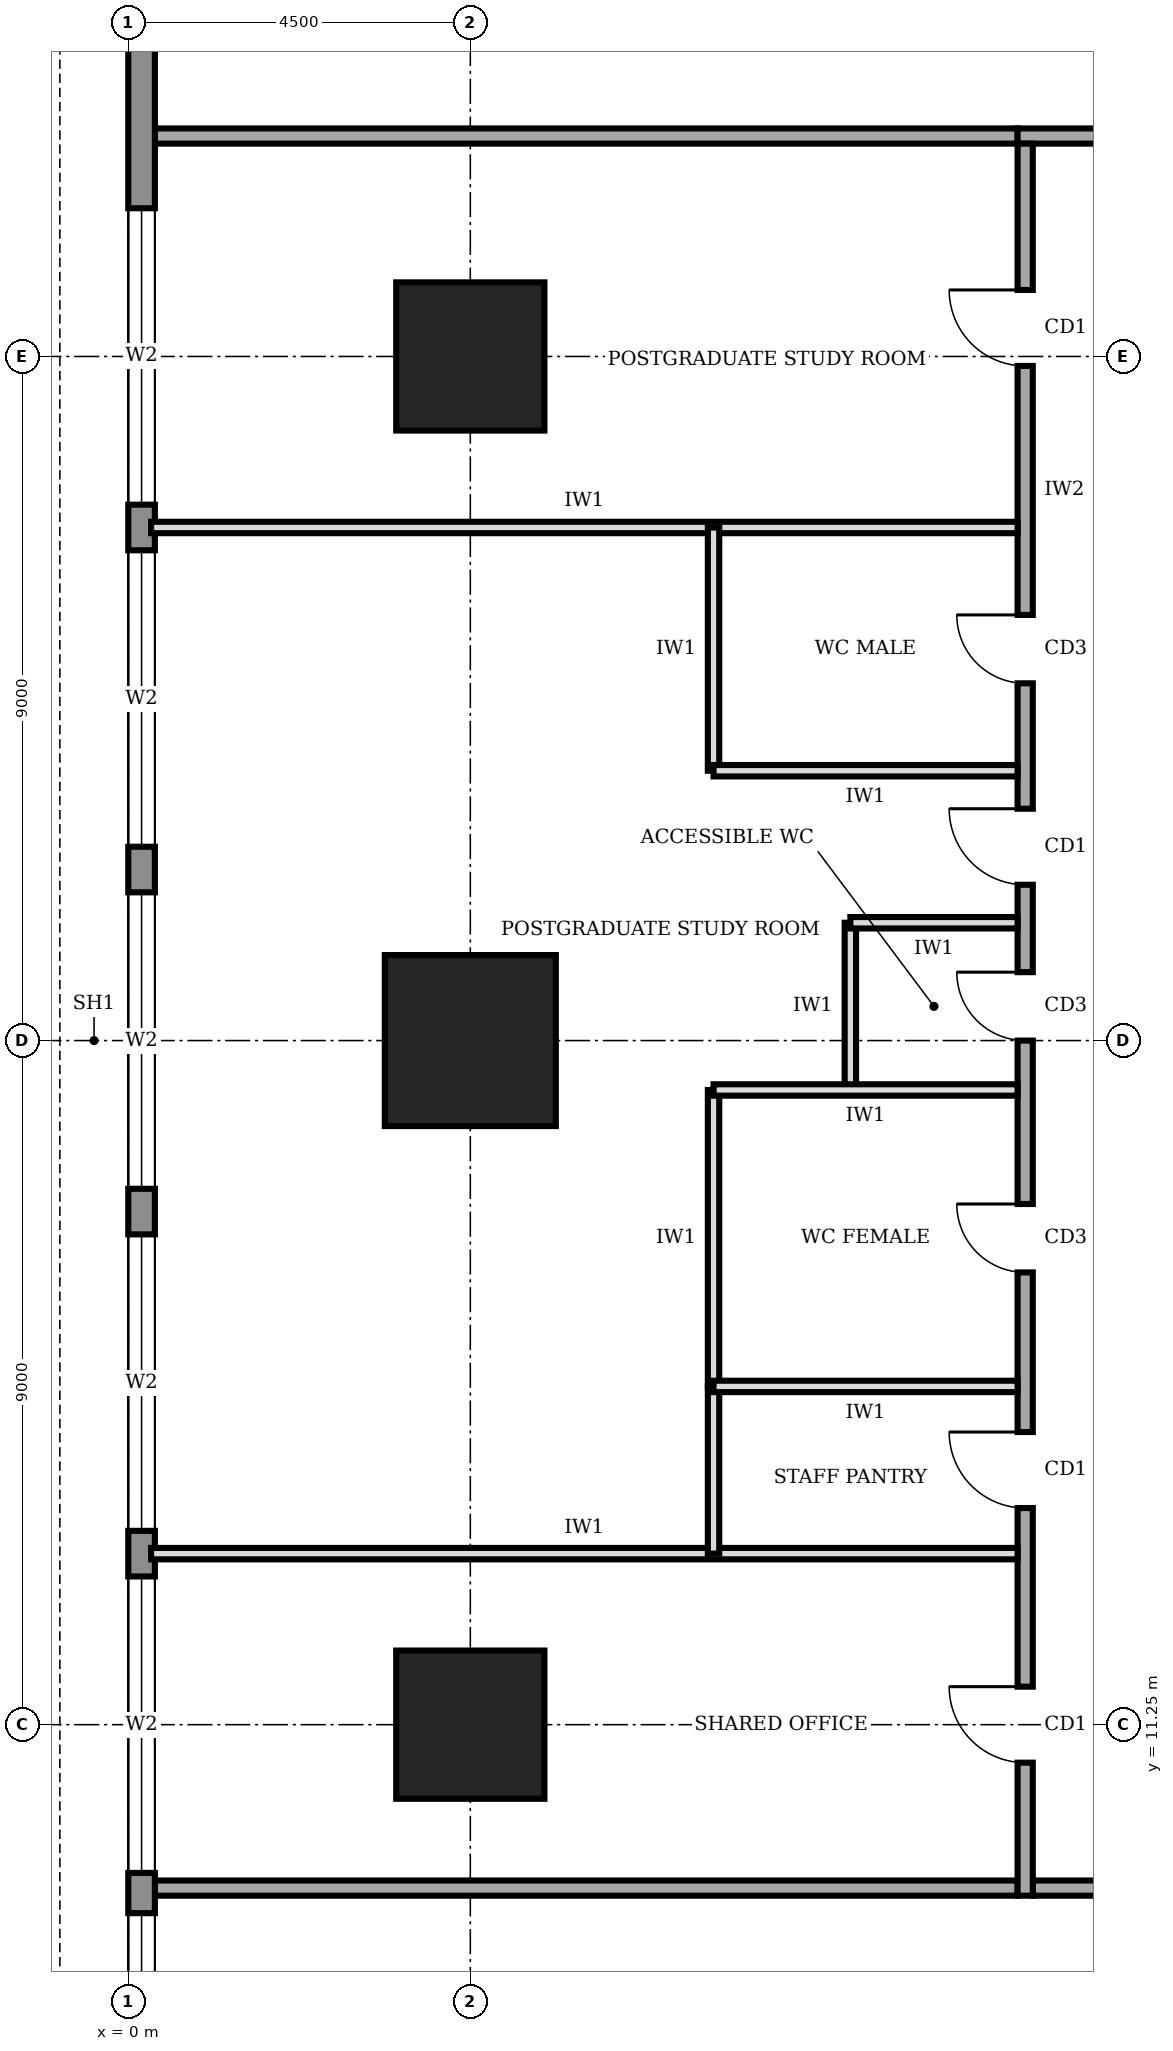
"""IFC4 building model, lengths in metres.
Left out: names, types, materials, properties, quantities, classifications, styles, units other than length and angle.
Written with IfcOpenShell. Run it as: python <this file> out.ifc"""

import sys

from ifc_helpers import new_model, si_unit, direction, frame, frame_2d, origin, origin_2d, place, context, subcontext, project, spatial, rectangle, extrude, element, fill, save


model = new_model("IFC4")
c1 = context("Model", 3, precision=1e-05, world=origin(), true_north=direction((0.0, 1.0)))
c2 = subcontext(c1, "Body", "Model", "MODEL_VIEW")
j1 = project(units=[si_unit("LENGTHUNIT", "METRE"), si_unit("PLANEANGLEUNIT", "RADIAN")], contexts=[c1])
p1 = place(None, origin())
s1 = spatial("IfcSite", under=j1, at=p1, CompositionType="ELEMENT")
p2 = place(p1, origin())
s2 = spatial("IfcBuilding", under=s1, at=p2, CompositionType="ELEMENT")
p3 = place(p2, frame((0.0, 0.0, 229.0)))
s3 = spatial("IfcBuildingStorey", under=s2, at=p3, CompositionType="ELEMENT", Elevation=229.0)
p4 = place(p3, frame((4.5, 11.25, 0.0), z_axis=(0.0, 0.0, 1.0), x_axis=(1.0, 0.0, 0.0)))
e1 = element("IfcColumn", 1, at=p4, inside=s3, PredefinedType="COLUMN", context=c2, shape_type="SweptSolid", body=[
    extrude(rectangle(XDim=1.95, YDim=1.95, at=origin_2d()), origin(), (0.0, 0.0, 1.0), 4.0),
])
p5 = place(p3, frame((4.5, 20.25, 0.0), z_axis=(0.0, 0.0, 1.0), x_axis=(1.0, 0.0, 0.0)))
e2 = element("IfcColumn", 2, at=p5, inside=s3, PredefinedType="COLUMN", context=c2, shape_type="SweptSolid", body=[
    extrude(rectangle(XDim=2.25, YDim=2.25, at=origin_2d()), origin(), (0.0, 0.0, 1.0), 4.0),
])
p6 = place(p3, frame((4.5, 29.25, 0.0), z_axis=(0.0, 0.0, 1.0), x_axis=(1.0, 0.0, 0.0)))
e3 = element("IfcColumn", 3, at=p6, inside=s3, PredefinedType="COLUMN", context=c2, shape_type="SweptSolid", body=[
    extrude(rectangle(XDim=1.95, YDim=1.95, at=origin_2d()), origin(), (0.0, 0.0, 1.0), 4.0),
])
p7 = place(p3, frame((0.175, 35.98, 0.0), z_axis=(0.0, 0.0, 1.0), x_axis=(0.0, -1.0, 0.0)))
e4 = element("IfcWall", 4, at=p7, inside=s3, PredefinedType="STANDARD", context=c2, shape_type="SweptSolid", body=[
    extrude(rectangle(XDim=31.46, YDim=0.35, at=frame_2d((15.73, 0.0))), origin(), (0.0, 0.0, 1.0), 3.75),
])
p8 = place(p7, frame((27.21, 0.0, 0.6)))
e5 = element("IfcOpeningElement", 5, at=p8, cuts=e4, PredefinedType="OPENING", context=c2, shape_type="SweptSolid", body=[
    extrude(rectangle(XDim=3.9, YDim=2.6, at=frame_2d((1.95, 1.3))), frame((0.0, 0.185, 0.0), z_axis=(0.0, -1.0, 0.0), x_axis=(1.0, 0.0, 0.0)), (0.0, 0.0, 1.0), 0.37),
])
p9 = place(p7, frame((22.78, 0.0, 0.6)))
e6 = element("IfcOpeningElement", 6, at=p9, cuts=e4, PredefinedType="OPENING", context=c2, shape_type="SweptSolid", body=[
    extrude(rectangle(XDim=3.9, YDim=2.6, at=frame_2d((1.95, 1.3))), frame((0.0, 0.185, 0.0), z_axis=(0.0, -1.0, 0.0), x_axis=(1.0, 0.0, 0.0)), (0.0, 0.0, 1.0), 0.37),
])
p10 = place(p7, frame((18.28, 0.0, 0.6)))
e7 = element("IfcOpeningElement", 7, at=p10, cuts=e4, PredefinedType="OPENING", context=c2, shape_type="SweptSolid", body=[
    extrude(rectangle(XDim=3.9, YDim=2.6, at=frame_2d((1.95, 1.3))), frame((0.0, 0.185, 0.0), z_axis=(0.0, -1.0, 0.0), x_axis=(1.0, 0.0, 0.0)), (0.0, 0.0, 1.0), 0.37),
])
p11 = place(p7, frame((13.78, 0.0, 0.6)))
e8 = element("IfcOpeningElement", 8, at=p11, cuts=e4, PredefinedType="OPENING", context=c2, shape_type="SweptSolid", body=[
    extrude(rectangle(XDim=3.9, YDim=2.6, at=frame_2d((1.95, 1.3))), frame((0.0, 0.185, 0.0), z_axis=(0.0, -1.0, 0.0), x_axis=(1.0, 0.0, 0.0)), (0.0, 0.0, 1.0), 0.37),
])
p12 = place(p7, frame((9.28, 0.0, 0.6)))
e9 = element("IfcOpeningElement", 9, at=p12, cuts=e4, PredefinedType="OPENING", context=c2, shape_type="SweptSolid", body=[
    extrude(rectangle(XDim=3.9, YDim=2.6, at=frame_2d((1.95, 1.3))), frame((0.0, 0.185, 0.0), z_axis=(0.0, -1.0, 0.0), x_axis=(1.0, 0.0, 0.0)), (0.0, 0.0, 1.0), 0.37),
])
p13 = place(p7, frame((4.78, 0.0, 0.6)))
e10 = element("IfcOpeningElement", 10, at=p13, cuts=e4, PredefinedType="OPENING", context=c2, shape_type="SweptSolid", body=[
    extrude(rectangle(XDim=3.9, YDim=2.6, at=frame_2d((1.95, 1.3))), frame((0.0, 0.185, 0.0), z_axis=(0.0, -1.0, 0.0), x_axis=(1.0, 0.0, 0.0)), (0.0, 0.0, 1.0), 0.37),
])
p14 = place(p3, frame((11.9, 9.1, 0.0), z_axis=(0.0, 0.0, 1.0), x_axis=(1.0, 0.0, 0.0)))
e11 = element("IfcWall", 11, at=p14, inside=s3, PredefinedType="SOLIDWALL", context=c2, shape_type="SweptSolid", body=[
    extrude(rectangle(XDim=16.9, YDim=0.2, at=frame_2d((8.45, 0.0))), origin(), (0.0, 0.0, 1.0), 3.75),
])
p15 = place(p3, frame((28.6, 32.15, 0.0), z_axis=(0.0, 0.0, 1.0), x_axis=(-1.0, 0.0, 0.0)))
e12 = element("IfcWall", 12, at=p15, inside=s3, PredefinedType="SOLIDWALL", context=c2, shape_type="SweptSolid", body=[
    extrude(rectangle(XDim=16.9, YDim=0.2, at=frame_2d((8.45, 0.0))), origin(), (0.0, 0.0, 1.0), 3.75),
])
p16 = place(p15, frame((12.85, 0.0, 0.0)))
e13 = element("IfcOpeningElement", 13, at=p16, cuts=e12, PredefinedType="OPENING", context=c2, shape_type="SweptSolid", body=[
    extrude(rectangle(XDim=1.8, YDim=2.1, at=frame_2d((0.9, 1.05))), frame((0.0, 0.11, 0.0), z_axis=(0.0, -1.0, 0.0), x_axis=(1.0, 0.0, 0.0)), (0.0, 0.0, 1.0), 0.22),
])
p17 = place(p15, frame((5.6, 0.0, 0.0)))
e14 = element("IfcOpeningElement", 14, at=p17, cuts=e12, PredefinedType="OPENING", context=c2, shape_type="SweptSolid", body=[
    extrude(rectangle(XDim=1.0, YDim=2.1, at=frame_2d((0.5, 1.05))), frame((0.0, 0.11, 0.0), z_axis=(0.0, -1.0, 0.0), x_axis=(1.0, 0.0, 0.0)), (0.0, 0.0, 1.0), 0.22),
])
p18 = place(p15, frame((0.275, 0.0, 0.0)))
e15 = element("IfcOpeningElement", 15, at=p18, cuts=e12, PredefinedType="OPENING", context=c2, shape_type="SweptSolid", body=[
    extrude(rectangle(XDim=1.0, YDim=2.1, at=frame_2d((0.5, 1.05))), frame((0.0, 0.11, 0.0), z_axis=(0.0, -1.0, 0.0), x_axis=(1.0, 0.0, 0.0)), (0.0, 0.0, 1.0), 0.22),
])
p19 = place(p3, frame((11.8, 32.05, 0.0), z_axis=(0.0, 0.0, 1.0), x_axis=(0.0, -1.0, 0.0)))
e16 = element("IfcWall", 16, at=p19, inside=s3, PredefinedType="SOLIDWALL", context=c2, shape_type="SweptSolid", body=[
    extrude(rectangle(XDim=23.05, YDim=0.2, at=frame_2d((11.525, 0.0))), origin(), (0.0, 0.0, 1.0), 3.75),
])
p20 = place(p19, frame((20.3, 0.0, 0.0)))
e17 = element("IfcOpeningElement", 17, at=p20, cuts=e16, PredefinedType="OPENING", context=c2, shape_type="SweptSolid", body=[
    extrude(rectangle(XDim=1.0, YDim=2.1, at=frame_2d((0.5, 1.05))), frame((0.0, 0.11, 0.0), z_axis=(0.0, -1.0, 0.0), x_axis=(1.0, 0.0, 0.0)), (0.0, 0.0, 1.0), 0.22),
])
p21 = place(p19, frame((16.95, 0.0, 0.0)))
e18 = element("IfcOpeningElement", 18, at=p21, cuts=e16, PredefinedType="OPENING", context=c2, shape_type="SweptSolid", body=[
    extrude(rectangle(XDim=1.0, YDim=2.1, at=frame_2d((0.5, 1.05))), frame((0.0, 0.11, 0.0), z_axis=(0.0, -1.0, 0.0), x_axis=(1.0, 0.0, 0.0)), (0.0, 0.0, 1.0), 0.22),
])
p22 = place(p19, frame((13.95, 0.0, 0.0)))
e19 = element("IfcOpeningElement", 19, at=p22, cuts=e16, PredefinedType="OPENING", context=c2, shape_type="SweptSolid", body=[
    extrude(rectangle(XDim=0.9, YDim=2.1, at=frame_2d((0.45, 1.05))), frame((0.0, 0.11, 0.0), z_axis=(0.0, -1.0, 0.0), x_axis=(1.0, 0.0, 0.0)), (0.0, 0.0, 1.0), 0.22),
])
p23 = place(p19, frame((10.9, 0.0, 0.0)))
e20 = element("IfcOpeningElement", 20, at=p23, cuts=e16, PredefinedType="OPENING", context=c2, shape_type="SweptSolid", body=[
    extrude(rectangle(XDim=0.9, YDim=2.1, at=frame_2d((0.45, 1.05))), frame((0.0, 0.11, 0.0), z_axis=(0.0, -1.0, 0.0), x_axis=(1.0, 0.0, 0.0)), (0.0, 0.0, 1.0), 0.22),
])
p24 = place(p19, frame((6.2, 0.0, 0.0)))
e21 = element("IfcOpeningElement", 21, at=p24, cuts=e16, PredefinedType="OPENING", context=c2, shape_type="SweptSolid", body=[
    extrude(rectangle(XDim=0.9, YDim=2.1, at=frame_2d((0.45, 1.05))), frame((0.0, 0.11, 0.0), z_axis=(0.0, -1.0, 0.0), x_axis=(1.0, 0.0, 0.0)), (0.0, 0.0, 1.0), 0.22),
])
p25 = place(p19, frame((8.75, 0.0, 0.0)))
e22 = element("IfcOpeningElement", 22, at=p25, cuts=e16, PredefinedType="OPENING", context=c2, shape_type="SweptSolid", body=[
    extrude(rectangle(XDim=1.0, YDim=2.1, at=frame_2d((0.5, 1.05))), frame((0.0, 0.11, 0.0), z_axis=(0.0, -1.0, 0.0), x_axis=(1.0, 0.0, 0.0)), (0.0, 0.0, 1.0), 0.22),
])
p26 = place(p19, frame((1.925, 0.0, 0.0)))
e23 = element("IfcOpeningElement", 23, at=p26, cuts=e16, PredefinedType="OPENING", context=c2, shape_type="SweptSolid", body=[
    extrude(rectangle(XDim=1.0, YDim=2.1, at=frame_2d((0.5, 1.05))), frame((0.0, 0.11, 0.0), z_axis=(0.0, -1.0, 0.0), x_axis=(1.0, 0.0, 0.0)), (0.0, 0.0, 1.0), 0.22),
])
for number, where, z_axis, x_axis in (
    (24, (0.3, 9.1, 0.0), (0.0, 0.0, 1.0), (1.0, 0.0, 0.0)),
    (25, (0.3, 32.15, 0.0), (0.0, 0.0, 1.0), (1.0, 0.0, 0.0)),
):
    element("IfcWall", number, at=place(p3, frame(where, z_axis=z_axis, x_axis=x_axis)), inside=s3, PredefinedType="SOLIDWALL", context=c2, shape_type="SweptSolid", body=[
        extrude(rectangle(XDim=11.4, YDim=0.2, at=frame_2d((5.7, 0.0))), origin(), (0.0, 0.0, 1.0), 3.75),
    ])
for number, where, z_axis, x_axis in (
    (26, (0.3, 13.5, 0.0), (0.0, 0.0, 1.0), (1.0, 0.0, 0.0)),
    (27, (0.3, 27.0, 0.0), (0.0, 0.0, 1.0), (1.0, 0.0, 0.0)),
):
    element("IfcWall", number, at=place(p3, frame(where, z_axis=z_axis, x_axis=x_axis)), inside=s3, PredefinedType="PARTITIONING", context=c2, shape_type="SweptSolid", body=[
        extrude(rectangle(XDim=11.4, YDim=0.15, at=frame_2d((5.7, 0.0))), origin(), (0.0, 0.0, 1.0), 3.75),
    ])
p27 = place(p3, frame((11.7, 15.7, 0.0), z_axis=(0.0, 0.0, 1.0), x_axis=(-1.0, 0.0, 0.0)))
e28 = element("IfcWall", 28, at=p27, inside=s3, PredefinedType="PARTITIONING", context=c2, shape_type="SweptSolid", body=[
    extrude(rectangle(XDim=4.0, YDim=0.15, at=frame_2d((2.0, 0.0))), origin(), (0.0, 0.0, 1.0), 3.75),
])
p28 = place(p3, frame((11.7, 19.6, 0.0), z_axis=(0.0, 0.0, 1.0), x_axis=(-1.0, 0.0, 0.0)))
e29 = element("IfcWall", 29, at=p28, inside=s3, PredefinedType="PARTITIONING", context=c2, shape_type="SweptSolid", body=[
    extrude(rectangle(XDim=4.0, YDim=0.15, at=frame_2d((2.0, 0.0))), origin(), (0.0, 0.0, 1.0), 2.85),
])
p29 = place(p3, frame((11.7, 21.8, 0.0), z_axis=(0.0, 0.0, 1.0), x_axis=(-1.0, 0.0, 0.0)))
e30 = element("IfcWall", 30, at=p29, inside=s3, PredefinedType="PARTITIONING", context=c2, shape_type="SweptSolid", body=[
    extrude(rectangle(XDim=2.2, YDim=0.15, at=frame_2d((1.1, 0.0))), origin(), (0.0, 0.0, 1.0), 3.75),
])
p30 = place(p3, frame((11.7, 23.8, 0.0), z_axis=(0.0, 0.0, 1.0), x_axis=(-1.0, 0.0, 0.0)))
e31 = element("IfcWall", 31, at=p30, inside=s3, PredefinedType="PARTITIONING", context=c2, shape_type="SweptSolid", body=[
    extrude(rectangle(XDim=4.0, YDim=0.15, at=frame_2d((2.0, 0.0))), origin(), (0.0, 0.0, 1.0), 3.75),
])
p31 = place(p3, frame((7.7, 13.5, 0.0), z_axis=(0.0, 0.0, 1.0), x_axis=(0.0, 1.0, 0.0)))
e32 = element("IfcWall", 32, at=p31, inside=s3, PredefinedType="PARTITIONING", context=c2, shape_type="SweptSolid", body=[
    extrude(rectangle(XDim=2.2, YDim=0.15, at=frame_2d((1.1, 0.0))), origin(), (0.0, 0.0, 1.0), 3.75),
])
p32 = place(p3, frame((7.7, 15.7, 0.0), z_axis=(0.0, 0.0, 1.0), x_axis=(0.0, 1.0, 0.0)))
e33 = element("IfcWall", 33, at=p32, inside=s3, PredefinedType="PARTITIONING", context=c2, shape_type="SweptSolid", body=[
    extrude(rectangle(XDim=3.9, YDim=0.15, at=frame_2d((1.95, 0.0))), origin(), (0.0, 0.0, 1.0), 3.75),
])
p33 = place(p3, frame((9.5, 19.6, 0.0), z_axis=(0.0, 0.0, 1.0), x_axis=(0.0, 1.0, 0.0)))
e34 = element("IfcWall", 34, at=p33, inside=s3, PredefinedType="PARTITIONING", context=c2, shape_type="SweptSolid", body=[
    extrude(rectangle(XDim=2.2, YDim=0.15, at=frame_2d((1.1, 0.0))), origin(), (0.0, 0.0, 1.0), 3.75),
])
p34 = place(p3, frame((7.7, 23.8, 0.0), z_axis=(0.0, 0.0, 1.0), x_axis=(0.0, 1.0, 0.0)))
e35 = element("IfcWall", 35, at=p34, inside=s3, PredefinedType="PARTITIONING", context=c2, shape_type="SweptSolid", body=[
    extrude(rectangle(XDim=3.2, YDim=0.15, at=frame_2d((1.6, 0.0))), origin(), (0.0, 0.0, 1.0), 3.75),
])
p35 = place(p8, origin())
e36 = element("IfcWindow", 36, at=p35, inside=s3, PartitioningType="SINGLE_PANEL", PredefinedType="WINDOW", context=c2, shape_type="SweptSolid", body=[
    extrude(rectangle(XDim=3.9, YDim=2.6, at=frame_2d((1.95, 1.3))), frame((0.0, 0.03, 0.0), z_axis=(0.0, -1.0, 0.0), x_axis=(1.0, 0.0, 0.0)), (0.0, 0.0, 1.0), 0.06),
])
fill(e5, e36)
p36 = place(p9, origin())
e37 = element("IfcWindow", 37, at=p36, inside=s3, PartitioningType="SINGLE_PANEL", PredefinedType="WINDOW", context=c2, shape_type="SweptSolid", body=[
    extrude(rectangle(XDim=3.9, YDim=2.6, at=frame_2d((1.95, 1.3))), frame((0.0, 0.03, 0.0), z_axis=(0.0, -1.0, 0.0), x_axis=(1.0, 0.0, 0.0)), (0.0, 0.0, 1.0), 0.06),
])
fill(e6, e37)
p37 = place(p10, origin())
e38 = element("IfcWindow", 38, at=p37, inside=s3, PartitioningType="SINGLE_PANEL", PredefinedType="WINDOW", context=c2, shape_type="SweptSolid", body=[
    extrude(rectangle(XDim=3.9, YDim=2.6, at=frame_2d((1.95, 1.3))), frame((0.0, 0.03, 0.0), z_axis=(0.0, -1.0, 0.0), x_axis=(1.0, 0.0, 0.0)), (0.0, 0.0, 1.0), 0.06),
])
fill(e7, e38)
p38 = place(p11, origin())
e39 = element("IfcWindow", 39, at=p38, inside=s3, PartitioningType="SINGLE_PANEL", PredefinedType="WINDOW", context=c2, shape_type="SweptSolid", body=[
    extrude(rectangle(XDim=3.9, YDim=2.6, at=frame_2d((1.95, 1.3))), frame((0.0, 0.03, 0.0), z_axis=(0.0, -1.0, 0.0), x_axis=(1.0, 0.0, 0.0)), (0.0, 0.0, 1.0), 0.06),
])
fill(e8, e39)
p39 = place(p12, origin())
e40 = element("IfcWindow", 40, at=p39, inside=s3, PartitioningType="SINGLE_PANEL", PredefinedType="WINDOW", context=c2, shape_type="SweptSolid", body=[
    extrude(rectangle(XDim=3.9, YDim=2.6, at=frame_2d((1.95, 1.3))), frame((0.0, 0.03, 0.0), z_axis=(0.0, -1.0, 0.0), x_axis=(1.0, 0.0, 0.0)), (0.0, 0.0, 1.0), 0.06),
])
fill(e9, e40)
p40 = place(p13, origin())
e41 = element("IfcWindow", 41, at=p40, inside=s3, PartitioningType="SINGLE_PANEL", PredefinedType="WINDOW", context=c2, shape_type="SweptSolid", body=[
    extrude(rectangle(XDim=3.9, YDim=2.6, at=frame_2d((1.95, 1.3))), frame((0.0, 0.03, 0.0), z_axis=(0.0, -1.0, 0.0), x_axis=(1.0, 0.0, 0.0)), (0.0, 0.0, 1.0), 0.06),
])
fill(e10, e41)
p41 = place(p20, frame((1.0, 0.0, 0.0), z_axis=(0.0, 0.0, 1.0), x_axis=(-1.0, 0.0, 0.0)))
e42 = element("IfcDoor", 42, at=p41, inside=s3, OperationType="SINGLE_SWING_RIGHT", PredefinedType="DOOR", context=c2, shape_type="SweptSolid", body=[
    extrude(rectangle(XDim=1.0, YDim=2.1, at=frame_2d((0.5, 1.05))), frame((0.0, 0.025, 0.0), z_axis=(0.0, -1.0, 0.0), x_axis=(1.0, 0.0, 0.0)), (0.0, 0.0, 1.0), 0.05),
])
fill(e17, e42)
p42 = place(p21, frame((1.0, 0.0, 0.0), z_axis=(0.0, 0.0, 1.0), x_axis=(-1.0, 0.0, 0.0)))
e43 = element("IfcDoor", 43, at=p42, inside=s3, OperationType="SINGLE_SWING_RIGHT", PredefinedType="DOOR", context=c2, shape_type="SweptSolid", body=[
    extrude(rectangle(XDim=1.0, YDim=2.1, at=frame_2d((0.5, 1.05))), frame((0.0, 0.025, 0.0), z_axis=(0.0, -1.0, 0.0), x_axis=(1.0, 0.0, 0.0)), (0.0, 0.0, 1.0), 0.05),
])
fill(e18, e43)
p43 = place(p22, frame((0.9, 0.0, 0.0), z_axis=(0.0, 0.0, 1.0), x_axis=(-1.0, 0.0, 0.0)))
e44 = element("IfcDoor", 44, at=p43, inside=s3, OperationType="SINGLE_SWING_RIGHT", PredefinedType="DOOR", context=c2, shape_type="SweptSolid", body=[
    extrude(rectangle(XDim=0.9, YDim=2.1, at=frame_2d((0.45, 1.05))), frame((0.0, 0.025, 0.0), z_axis=(0.0, -1.0, 0.0), x_axis=(1.0, 0.0, 0.0)), (0.0, 0.0, 1.0), 0.05),
])
fill(e19, e44)
p44 = place(p23, frame((0.9, 0.0, 0.0), z_axis=(0.0, 0.0, 1.0), x_axis=(-1.0, 0.0, 0.0)))
e45 = element("IfcDoor", 45, at=p44, inside=s3, OperationType="SINGLE_SWING_RIGHT", PredefinedType="DOOR", context=c2, shape_type="SweptSolid", body=[
    extrude(rectangle(XDim=0.9, YDim=2.1, at=frame_2d((0.45, 1.05))), frame((0.0, 0.025, 0.0), z_axis=(0.0, -1.0, 0.0), x_axis=(1.0, 0.0, 0.0)), (0.0, 0.0, 1.0), 0.05),
])
fill(e20, e45)
p45 = place(p24, frame((0.9, 0.0, 0.0), z_axis=(0.0, 0.0, 1.0), x_axis=(-1.0, 0.0, 0.0)))
e46 = element("IfcDoor", 46, at=p45, inside=s3, OperationType="SINGLE_SWING_RIGHT", PredefinedType="DOOR", context=c2, shape_type="SweptSolid", body=[
    extrude(rectangle(XDim=0.9, YDim=2.1, at=frame_2d((0.45, 1.05))), frame((0.0, 0.025, 0.0), z_axis=(0.0, -1.0, 0.0), x_axis=(1.0, 0.0, 0.0)), (0.0, 0.0, 1.0), 0.05),
])
fill(e21, e46)
p46 = place(p25, frame((1.0, 0.0, 0.0), z_axis=(0.0, 0.0, 1.0), x_axis=(-1.0, 0.0, 0.0)))
e47 = element("IfcDoor", 47, at=p46, inside=s3, OperationType="SINGLE_SWING_RIGHT", PredefinedType="DOOR", context=c2, shape_type="SweptSolid", body=[
    extrude(rectangle(XDim=1.0, YDim=2.1, at=frame_2d((0.5, 1.05))), frame((0.0, 0.025, 0.0), z_axis=(0.0, -1.0, 0.0), x_axis=(1.0, 0.0, 0.0)), (0.0, 0.0, 1.0), 0.05),
])
fill(e22, e47)
p47 = place(p26, frame((1.0, 0.0, 0.0), z_axis=(0.0, 0.0, 1.0), x_axis=(-1.0, 0.0, 0.0)))
e48 = element("IfcDoor", 48, at=p47, inside=s3, OperationType="SINGLE_SWING_RIGHT", PredefinedType="DOOR", context=c2, shape_type="SweptSolid", body=[
    extrude(rectangle(XDim=1.0, YDim=2.1, at=frame_2d((0.5, 1.05))), frame((0.0, 0.025, 0.0), z_axis=(0.0, -1.0, 0.0), x_axis=(1.0, 0.0, 0.0)), (0.0, 0.0, 1.0), 0.05),
])
fill(e23, e48)
save(model, sys.argv[1])
